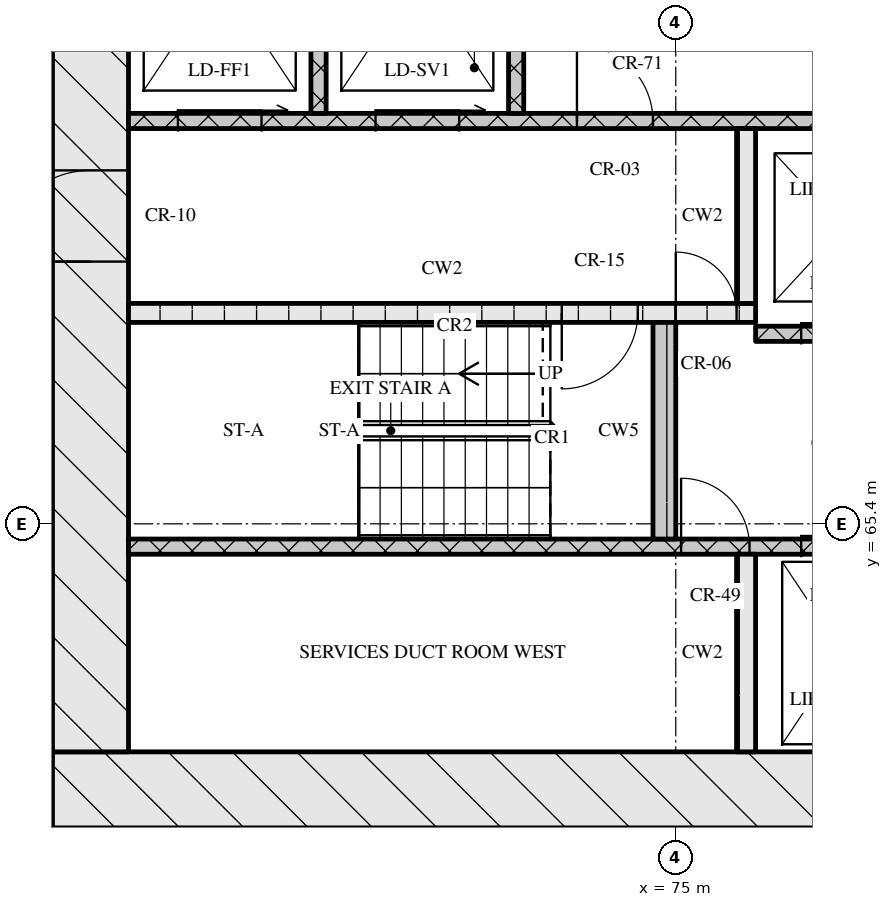
"""IFC4 building model, lengths in metres.
Left out: names, types, materials, properties, quantities, classifications, styles, units other than length and angle.
Written with IfcOpenShell. Run it as: python <this file> out.ifc"""

import sys

from ifc_helpers import new_model, si_unit, direction, frame, frame_2d, origin, place, context, subcontext, project, spatial, rectangle, extrude, element, fill, save


model = new_model("IFC4")
c1 = context("Model", 3, precision=1e-05, world=origin(), true_north=direction((0.0, 1.0)))
c2 = subcontext(c1, "Body", "Model", "MODEL_VIEW")
j1 = project(units=[si_unit("LENGTHUNIT", "METRE"), si_unit("PLANEANGLEUNIT", "RADIAN")], contexts=[c1])
p1 = place(None, origin())
s1 = spatial("IfcSite", under=j1, at=p1, CompositionType="ELEMENT")
p2 = place(p1, origin())
s2 = spatial("IfcBuilding", under=s1, at=p2, CompositionType="ELEMENT")
p3 = place(p2, frame((0.0, 0.0, 95.25)))
s3 = spatial("IfcBuildingStorey", under=s2, at=p3, CompositionType="ELEMENT", Elevation=95.25)
p4 = place(p3, frame((66.8, 61.9, 0.0), z_axis=(0.0, 0.0, 1.0), x_axis=(1.0, 0.0, 0.0)))
e1 = element("IfcWall", 1, at=p4, inside=s3, PredefinedType="SOLIDWALL", context=c2, shape_type="SweptSolid", body=[
    extrude(rectangle(XDim=41.6, YDim=1.0, at=frame_2d((20.8, 0.0))), origin(), (0.0, 0.0, 1.0), 3.32),
])
p5 = place(p4, frame((21.15, 0.0, 0.0)))
e2 = element("IfcOpeningElement", 2, at=p5, cuts=e1, PredefinedType="OPENING", context=c2, shape_type="SweptSolid", body=[
    extrude(rectangle(XDim=1.8, YDim=2.1, at=frame_2d((0.9, 1.05))), frame((0.0, 0.51, 0.0), z_axis=(0.0, -1.0, 0.0), x_axis=(1.0, 0.0, 0.0)), (0.0, 0.0, 1.0), 1.02),
])
p6 = place(p3, frame((67.3, 62.4, 0.0), z_axis=(0.0, 0.0, 1.0), x_axis=(0.0, 1.0, 0.0)))
e3 = element("IfcWall", 3, at=p6, inside=s3, PredefinedType="SOLIDWALL", context=c2, shape_type="SweptSolid", body=[
    extrude(rectangle(XDim=12.0, YDim=1.0, at=frame_2d((6.0, 0.0))), origin(), (0.0, 0.0, 1.0), 3.32),
])
p7 = place(p6, frame((6.45, 0.0, 0.0)))
e4 = element("IfcOpeningElement", 4, at=p7, cuts=e3, PredefinedType="OPENING", context=c2, shape_type="SweptSolid", body=[
    extrude(rectangle(XDim=1.2, YDim=2.1, at=frame_2d((0.6, 1.05))), frame((0.0, 0.51, 0.0), z_axis=(0.0, -1.0, 0.0), x_axis=(1.0, 0.0, 0.0)), (0.0, 0.0, 1.0), 1.02),
])
p8 = place(p3, frame((75.925, 62.4, 0.0), z_axis=(0.0, 0.0, 1.0), x_axis=(0.0, 1.0, 0.0)))
e5 = element("IfcWall", 5, at=p8, inside=s3, PredefinedType="SOLIDWALL", context=c2, shape_type="SweptSolid", body=[
    extrude(rectangle(XDim=2.6, YDim=0.25, at=frame_2d((1.3, 0.0))), origin(), (0.0, 0.0, 1.0), 3.32),
])
p9 = place(p3, frame((67.8, 65.1, 0.0), z_axis=(0.0, 0.0, 1.0), x_axis=(1.0, 0.0, 0.0)))
e6 = element("IfcWall", 6, at=p9, inside=s3, PredefinedType="SOLIDWALL", context=c2, shape_type="SweptSolid", body=[
    extrude(rectangle(XDim=18.5, YDim=0.2, at=frame_2d((9.25, 0.0))), origin(), (0.0, 0.0, 1.0), 3.32),
])
p10 = place(p9, frame((7.27, 0.0, 0.0)))
e7 = element("IfcOpeningElement", 7, at=p10, cuts=e6, PredefinedType="OPENING", context=c2, shape_type="SweptSolid", body=[
    extrude(rectangle(XDim=0.9, YDim=2.1, at=frame_2d((0.45, 1.05))), frame((0.0, 0.11, 0.0), z_axis=(0.0, -1.0, 0.0), x_axis=(1.0, 0.0, 0.0)), (0.0, 0.0, 1.0), 0.22),
])
p11 = place(p9, frame((8.85, 0.0, 0.0)))
e8 = element("IfcOpeningElement", 8, at=p11, cuts=e6, PredefinedType="OPENING", context=c2, shape_type="SweptSolid", body=[
    extrude(rectangle(XDim=1.1, YDim=2.1, at=frame_2d((0.55, 1.05))), frame((0.0, 0.11, 0.0), z_axis=(0.0, -1.0, 0.0), x_axis=(1.0, 0.0, 0.0)), (0.0, 0.0, 1.0), 0.22),
])
p12 = place(p9, frame((11.35, 0.0, 0.0)))
e9 = element("IfcOpeningElement", 9, at=p12, cuts=e6, PredefinedType="OPENING", context=c2, shape_type="SweptSolid", body=[
    extrude(rectangle(XDim=1.1, YDim=2.1, at=frame_2d((0.55, 1.05))), frame((0.0, 0.11, 0.0), z_axis=(0.0, -1.0, 0.0), x_axis=(1.0, 0.0, 0.0)), (0.0, 0.0, 1.0), 0.22),
])
p13 = place(p9, frame((13.85, 0.0, 0.0)))
e10 = element("IfcOpeningElement", 10, at=p13, cuts=e6, PredefinedType="OPENING", context=c2, shape_type="SweptSolid", body=[
    extrude(rectangle(XDim=1.1, YDim=2.1, at=frame_2d((0.55, 1.05))), frame((0.0, 0.11, 0.0), z_axis=(0.0, -1.0, 0.0), x_axis=(1.0, 0.0, 0.0)), (0.0, 0.0, 1.0), 0.22),
])
p14 = place(p9, frame((16.7, 0.0, 0.0)))
e11 = element("IfcOpeningElement", 11, at=p14, cuts=e6, PredefinedType="OPENING", context=c2, shape_type="SweptSolid", body=[
    extrude(rectangle(XDim=0.9, YDim=2.1, at=frame_2d((0.45, 1.05))), frame((0.0, 0.11, 0.0), z_axis=(0.0, -1.0, 0.0), x_axis=(1.0, 0.0, 0.0)), (0.0, 0.0, 1.0), 0.22),
])
p15 = place(p3, frame((74.85, 65.2, 0.0), z_axis=(0.0, 0.0, 1.0), x_axis=(0.0, 1.0, 0.0)))
e12 = element("IfcWall", 12, at=p15, inside=s3, PredefinedType="SOLIDWALL", context=c2, shape_type="SweptSolid", body=[
    extrude(rectangle(XDim=2.85, YDim=0.3, at=frame_2d((1.425, 0.0))), origin(), (0.0, 0.0, 1.0), 3.32),
])
p16 = place(p3, frame((76.05, 67.9, 0.0), z_axis=(0.0, 0.0, 1.0), x_axis=(1.0, 0.0, 0.0)))
e13 = element("IfcWall", 13, at=p16, inside=s3, PredefinedType="SOLIDWALL", context=c2, shape_type="SweptSolid", body=[
    extrude(rectangle(XDim=23.1, YDim=0.2, at=frame_2d((11.55, 0.0))), origin(), (0.0, 0.0, 1.0), 3.32),
])
p17 = place(p16, frame((0.6, 0.0, 0.0)))
e14 = element("IfcOpeningElement", 14, at=p17, cuts=e13, PredefinedType="OPENING", context=c2, shape_type="SweptSolid", body=[
    extrude(rectangle(XDim=1.1, YDim=2.1, at=frame_2d((0.55, 1.05))), frame((0.0, 0.11, 0.0), z_axis=(0.0, -1.0, 0.0), x_axis=(1.0, 0.0, 0.0)), (0.0, 0.0, 1.0), 0.22),
])
p18 = place(p16, frame((3.1, 0.0, 0.0)))
e15 = element("IfcOpeningElement", 15, at=p18, cuts=e13, PredefinedType="OPENING", context=c2, shape_type="SweptSolid", body=[
    extrude(rectangle(XDim=1.1, YDim=2.1, at=frame_2d((0.55, 1.05))), frame((0.0, 0.11, 0.0), z_axis=(0.0, -1.0, 0.0), x_axis=(1.0, 0.0, 0.0)), (0.0, 0.0, 1.0), 0.22),
])
p19 = place(p16, frame((5.6, 0.0, 0.0)))
e16 = element("IfcOpeningElement", 16, at=p19, cuts=e13, PredefinedType="OPENING", context=c2, shape_type="SweptSolid", body=[
    extrude(rectangle(XDim=1.1, YDim=2.1, at=frame_2d((0.55, 1.05))), frame((0.0, 0.11, 0.0), z_axis=(0.0, -1.0, 0.0), x_axis=(1.0, 0.0, 0.0)), (0.0, 0.0, 1.0), 0.22),
])
p20 = place(p16, frame((8.45, 0.0, 0.0)))
e17 = element("IfcOpeningElement", 17, at=p20, cuts=e13, PredefinedType="OPENING", context=c2, shape_type="SweptSolid", body=[
    extrude(rectangle(XDim=0.9, YDim=2.1, at=frame_2d((0.45, 1.05))), frame((0.0, 0.11, 0.0), z_axis=(0.0, -1.0, 0.0), x_axis=(1.0, 0.0, 0.0)), (0.0, 0.0, 1.0), 0.22),
])
p21 = place(p16, frame((10.91, 0.0, 0.0)))
e18 = element("IfcOpeningElement", 18, at=p21, cuts=e13, PredefinedType="OPENING", context=c2, shape_type="SweptSolid", body=[
    extrude(rectangle(XDim=0.9, YDim=2.1, at=frame_2d((0.45, 1.05))), frame((0.0, 0.11, 0.0), z_axis=(0.0, -1.0, 0.0), x_axis=(1.0, 0.0, 0.0)), (0.0, 0.0, 1.0), 0.22),
])
p22 = place(p16, frame((13.55, 0.0, 0.0)))
e19 = element("IfcOpeningElement", 19, at=p22, cuts=e13, PredefinedType="OPENING", context=c2, shape_type="SweptSolid", body=[
    extrude(rectangle(XDim=1.0, YDim=2.1, at=frame_2d((0.5, 1.05))), frame((0.0, 0.11, 0.0), z_axis=(0.0, -1.0, 0.0), x_axis=(1.0, 0.0, 0.0)), (0.0, 0.0, 1.0), 0.22),
])
p23 = place(p3, frame((67.8, 68.175, 0.0), z_axis=(0.0, 0.0, 1.0), x_axis=(1.0, 0.0, 0.0)))
e20 = element("IfcWall", 20, at=p23, inside=s3, PredefinedType="SOLIDWALL", context=c2, shape_type="SweptSolid", body=[
    extrude(rectangle(XDim=8.25, YDim=0.25, at=frame_2d((4.125, 0.0))), origin(), (0.0, 0.0, 1.0), 3.32),
])
p24 = place(p23, frame((5.7, 0.0, 0.0)))
e21 = element("IfcOpeningElement", 21, at=p24, cuts=e20, PredefinedType="OPENING", context=c2, shape_type="SweptSolid", body=[
    extrude(rectangle(XDim=1.0, YDim=2.1, at=frame_2d((0.5, 1.05))), frame((0.0, 0.135, 0.0), z_axis=(0.0, -1.0, 0.0), x_axis=(1.0, 0.0, 0.0)), (0.0, 0.0, 1.0), 0.27),
])
p25 = place(p23, frame((7.2, 0.0, 0.0)))
e22 = element("IfcOpeningElement", 22, at=p25, cuts=e20, PredefinedType="OPENING", context=c2, shape_type="SweptSolid", body=[
    extrude(rectangle(XDim=0.8, YDim=2.1, at=frame_2d((0.4, 1.05))), frame((0.0, 0.135, 0.0), z_axis=(0.0, -1.0, 0.0), x_axis=(1.0, 0.0, 0.0)), (0.0, 0.0, 1.0), 0.27),
])
p26 = place(p3, frame((75.925, 68.3, 0.0), z_axis=(0.0, 0.0, 1.0), x_axis=(0.0, 1.0, 0.0)))
e23 = element("IfcWall", 23, at=p26, inside=s3, PredefinedType="SOLIDWALL", context=c2, shape_type="SweptSolid", body=[
    extrude(rectangle(XDim=2.3, YDim=0.25, at=frame_2d((1.15, 0.0))), origin(), (0.0, 0.0, 1.0), 3.32),
])
p27 = place(p3, frame((67.8, 70.7, 0.0), z_axis=(0.0, 0.0, 1.0), x_axis=(1.0, 0.0, 0.0)))
e24 = element("IfcWall", 24, at=p27, inside=s3, PredefinedType="SOLIDWALL", context=c2, shape_type="SweptSolid", body=[
    extrude(rectangle(XDim=39.6, YDim=0.2, at=frame_2d((19.8, 0.0))), origin(), (0.0, 0.0, 1.0), 3.32),
])
p28 = place(p27, frame((0.65, 0.0, 0.0)))
e25 = element("IfcOpeningElement", 25, at=p28, cuts=e24, PredefinedType="OPENING", context=c2, shape_type="SweptSolid", body=[
    extrude(rectangle(XDim=1.1, YDim=2.1, at=frame_2d((0.55, 1.05))), frame((0.0, 0.11, 0.0), z_axis=(0.0, -1.0, 0.0), x_axis=(1.0, 0.0, 0.0)), (0.0, 0.0, 1.0), 0.22),
])
p29 = place(p27, frame((3.25, 0.0, 0.0)))
e26 = element("IfcOpeningElement", 26, at=p29, cuts=e24, PredefinedType="OPENING", context=c2, shape_type="SweptSolid", body=[
    extrude(rectangle(XDim=1.1, YDim=2.1, at=frame_2d((0.55, 1.05))), frame((0.0, 0.11, 0.0), z_axis=(0.0, -1.0, 0.0), x_axis=(1.0, 0.0, 0.0)), (0.0, 0.0, 1.0), 0.22),
])
p30 = place(p27, frame((5.9, 0.0, 0.0)))
e27 = element("IfcOpeningElement", 27, at=p30, cuts=e24, PredefinedType="OPENING", context=c2, shape_type="SweptSolid", body=[
    extrude(rectangle(XDim=1.0, YDim=2.1, at=frame_2d((0.5, 1.05))), frame((0.0, 0.11, 0.0), z_axis=(0.0, -1.0, 0.0), x_axis=(1.0, 0.0, 0.0)), (0.0, 0.0, 1.0), 0.22),
])
p31 = place(p27, frame((21.7, 0.0, 0.0)))
e28 = element("IfcOpeningElement", 28, at=p31, cuts=e24, PredefinedType="OPENING", context=c2, shape_type="SweptSolid", body=[
    extrude(rectangle(XDim=1.0, YDim=2.1, at=frame_2d((0.5, 1.05))), frame((0.0, 0.11, 0.0), z_axis=(0.0, -1.0, 0.0), x_axis=(1.0, 0.0, 0.0)), (0.0, 0.0, 1.0), 0.22),
])
p32 = place(p27, frame((32.7, 0.0, 0.0)))
e29 = element("IfcOpeningElement", 29, at=p32, cuts=e24, PredefinedType="OPENING", context=c2, shape_type="SweptSolid", body=[
    extrude(rectangle(XDim=1.0, YDim=2.1, at=frame_2d((0.5, 1.05))), frame((0.0, 0.11, 0.0), z_axis=(0.0, -1.0, 0.0), x_axis=(1.0, 0.0, 0.0)), (0.0, 0.0, 1.0), 0.22),
])
p33 = place(p27, frame((35.25, 0.0, 0.0)))
e30 = element("IfcOpeningElement", 30, at=p33, cuts=e24, PredefinedType="OPENING", context=c2, shape_type="SweptSolid", body=[
    extrude(rectangle(XDim=1.1, YDim=2.1, at=frame_2d((0.55, 1.05))), frame((0.0, 0.11, 0.0), z_axis=(0.0, -1.0, 0.0), x_axis=(1.0, 0.0, 0.0)), (0.0, 0.0, 1.0), 0.22),
])
p34 = place(p27, frame((37.85, 0.0, 0.0)))
e31 = element("IfcOpeningElement", 31, at=p34, cuts=e24, PredefinedType="OPENING", context=c2, shape_type="SweptSolid", body=[
    extrude(rectangle(XDim=1.1, YDim=2.1, at=frame_2d((0.55, 1.05))), frame((0.0, 0.11, 0.0), z_axis=(0.0, -1.0, 0.0), x_axis=(1.0, 0.0, 0.0)), (0.0, 0.0, 1.0), 0.22),
])
p35 = place(p3, frame((70.3, 70.8, 0.0), z_axis=(0.0, 0.0, 1.0), x_axis=(0.0, 1.0, 0.0)))
e32 = element("IfcWall", 32, at=p35, inside=s3, PredefinedType="SOLIDWALL", context=c2, shape_type="SweptSolid", body=[
    extrude(rectangle(XDim=3.6, YDim=0.2, at=frame_2d((1.8, 0.0))), origin(), (0.0, 0.0, 1.0), 3.32),
])
p36 = place(p3, frame((72.9, 70.8, 0.0), z_axis=(0.0, 0.0, 1.0), x_axis=(0.0, 1.0, 0.0)))
e33 = element("IfcWall", 33, at=p36, inside=s3, PredefinedType="SOLIDWALL", context=c2, shape_type="SweptSolid", body=[
    extrude(rectangle(XDim=1.2, YDim=0.2, at=frame_2d((0.6, 0.0))), origin(), (0.0, 0.0, 1.0), 3.32),
])
p37 = place(p10, origin())
e34 = element("IfcDoor", 34, at=p37, inside=s3, OperationType="SINGLE_SWING_LEFT", PredefinedType="DOOR", context=c2, shape_type="SweptSolid", body=[
    extrude(rectangle(XDim=0.9, YDim=2.1, at=frame_2d((0.45, 1.05))), frame((0.0, 0.025, 0.0), z_axis=(0.0, -1.0, 0.0), x_axis=(1.0, 0.0, 0.0)), (0.0, 0.0, 1.0), 0.05),
])
fill(e7, e34)
p38 = place(p11, origin())
e35 = element("IfcDoor", 35, at=p38, inside=s3, OperationType="SLIDING_TO_LEFT", PredefinedType="DOOR", context=c2, shape_type="SweptSolid", body=[
    extrude(rectangle(XDim=1.1, YDim=2.1, at=frame_2d((0.55, 1.05))), frame((0.0, 0.025, 0.0), z_axis=(0.0, -1.0, 0.0), x_axis=(1.0, 0.0, 0.0)), (0.0, 0.0, 1.0), 0.05),
])
fill(e8, e35)
p39 = place(p17, origin())
e36 = element("IfcDoor", 36, at=p39, inside=s3, OperationType="SLIDING_TO_RIGHT", PredefinedType="DOOR", context=c2, shape_type="SweptSolid", body=[
    extrude(rectangle(XDim=1.1, YDim=2.1, at=frame_2d((0.55, 1.05))), frame((0.0, 0.025, 0.0), z_axis=(0.0, -1.0, 0.0), x_axis=(1.0, 0.0, 0.0)), (0.0, 0.0, 1.0), 0.05),
])
fill(e14, e36)
p40 = place(p24, origin())
e37 = element("IfcDoor", 37, at=p40, inside=s3, OperationType="SINGLE_SWING_RIGHT", PredefinedType="DOOR", context=c2, shape_type="SweptSolid", body=[
    extrude(rectangle(XDim=1.0, YDim=2.1, at=frame_2d((0.5, 1.05))), frame((0.0, 0.025, 0.0), z_axis=(0.0, -1.0, 0.0), x_axis=(1.0, 0.0, 0.0)), (0.0, 0.0, 1.0), 0.05),
])
fill(e21, e37)
p41 = place(p25, origin())
e38 = element("IfcDoor", 38, at=p41, inside=s3, OperationType="SINGLE_SWING_LEFT", PredefinedType="DOOR", context=c2, shape_type="SweptSolid", body=[
    extrude(rectangle(XDim=0.8, YDim=2.1, at=frame_2d((0.4, 1.05))), frame((0.0, 0.025, 0.0), z_axis=(0.0, -1.0, 0.0), x_axis=(1.0, 0.0, 0.0)), (0.0, 0.0, 1.0), 0.05),
])
fill(e22, e38)
p42 = place(p7, origin())
e39 = element("IfcDoor", 39, at=p42, inside=s3, OperationType="SINGLE_SWING_LEFT", PredefinedType="DOOR", context=c2, shape_type="SweptSolid", body=[
    extrude(rectangle(XDim=1.2, YDim=2.1, at=frame_2d((0.6, 1.05))), frame((0.0, 0.025, 0.0), z_axis=(0.0, -1.0, 0.0), x_axis=(1.0, 0.0, 0.0)), (0.0, 0.0, 1.0), 0.05),
])
fill(e4, e39)
p43 = place(p28, origin())
e40 = element("IfcDoor", 40, at=p43, inside=s3, OperationType="SLIDING_TO_RIGHT", PredefinedType="DOOR", context=c2, shape_type="SweptSolid", body=[
    extrude(rectangle(XDim=1.1, YDim=2.1, at=frame_2d((0.55, 1.05))), frame((0.0, 0.025, 0.0), z_axis=(0.0, -1.0, 0.0), x_axis=(1.0, 0.0, 0.0)), (0.0, 0.0, 1.0), 0.05),
])
fill(e25, e40)
p44 = place(p29, origin())
e41 = element("IfcDoor", 41, at=p44, inside=s3, OperationType="SLIDING_TO_RIGHT", PredefinedType="DOOR", context=c2, shape_type="SweptSolid", body=[
    extrude(rectangle(XDim=1.1, YDim=2.1, at=frame_2d((0.55, 1.05))), frame((0.0, 0.025, 0.0), z_axis=(0.0, -1.0, 0.0), x_axis=(1.0, 0.0, 0.0)), (0.0, 0.0, 1.0), 0.05),
])
fill(e26, e41)
p45 = place(p30, origin())
e42 = element("IfcDoor", 42, at=p45, inside=s3, OperationType="SINGLE_SWING_LEFT", PredefinedType="DOOR", context=c2, shape_type="SweptSolid", body=[
    extrude(rectangle(XDim=1.0, YDim=2.1, at=frame_2d((0.5, 1.05))), frame((0.0, 0.025, 0.0), z_axis=(0.0, -1.0, 0.0), x_axis=(1.0, 0.0, 0.0)), (0.0, 0.0, 1.0), 0.05),
])
fill(e27, e42)
save(model, sys.argv[1])
